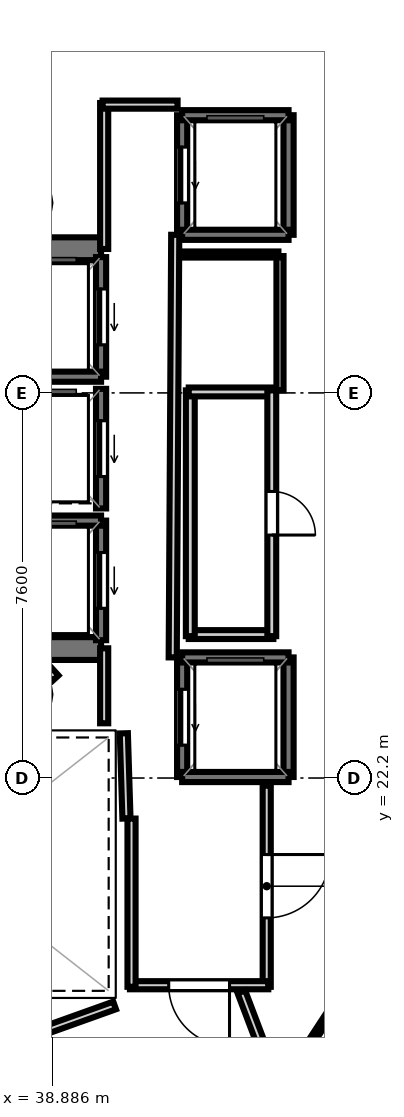
"""IFC4 building model, lengths in metres.
Left out: names, types, materials, properties, quantities, classifications, styles, units other than length and angle.
Written with IfcOpenShell. Run it as: python <this file> out.ifc"""

import sys

from ifc_helpers import new_model, si_unit, direction, frame, frame_2d, origin, place, context, subcontext, project, spatial, rectangle, extrude, element, fill, save


model = new_model("IFC4")
c1 = context("Model", 3, precision=1e-05, world=origin(), true_north=direction((0.0, 1.0)))
c2 = subcontext(c1, "Body", "Model", "MODEL_VIEW")
j1 = project(units=[si_unit("LENGTHUNIT", "METRE"), si_unit("PLANEANGLEUNIT", "RADIAN")], contexts=[c1])
p1 = place(None, origin())
s1 = spatial("IfcSite", under=j1, at=p1, CompositionType="ELEMENT")
p2 = place(p1, origin())
s2 = spatial("IfcBuilding", under=s1, at=p2, CompositionType="ELEMENT")
p3 = place(p2, frame((0.0, 0.0, 288.0)))
s3 = spatial("IfcBuildingStorey", under=s2, at=p3, CompositionType="ELEMENT", Elevation=288.0)
p4 = place(p3, frame((29.33, 32.645, 0.0), z_axis=(0.0, 0.0, 1.0), x_axis=(1.0, 0.0, 0.0)))
e1 = element("IfcWall", 1, at=p4, inside=s3, PredefinedType="SHEAR", context=c2, shape_type="SweptSolid", body=[
    extrude(rectangle(XDim=10.52, YDim=0.45, at=frame_2d((5.26, 0.0))), origin(), (0.0, 0.0, 1.0), 3.52),
])
p5 = place(p4, frame((0.895, 0.0, 0.0)))
e2 = element("IfcOpeningElement", 2, at=p5, cuts=e1, PredefinedType="OPENING", context=c2, shape_type="SweptSolid", body=[
    extrude(rectangle(XDim=1.25, YDim=2.15, at=frame_2d((0.625, 1.075))), frame((0.0, 0.235, 0.0), z_axis=(0.0, -1.0, 0.0), x_axis=(1.0, 0.0, 0.0)), (0.0, 0.0, 1.0), 0.47),
])
p6 = place(p3, frame((29.33, 24.755, 0.0), z_axis=(0.0, 0.0, 1.0), x_axis=(1.0, 0.0, 0.0)))
e3 = element("IfcWall", 3, at=p6, inside=s3, PredefinedType="SHEAR", context=c2, shape_type="SweptSolid", body=[
    extrude(rectangle(XDim=10.52, YDim=0.45, at=frame_2d((5.26, 0.0))), origin(), (0.0, 0.0, 1.0), 3.52),
])
p7 = place(p6, frame((0.695, 0.0, 0.0)))
e4 = element("IfcOpeningElement", 4, at=p7, cuts=e3, PredefinedType="OPENING", context=c2, shape_type="SweptSolid", body=[
    extrude(rectangle(XDim=1.25, YDim=2.15, at=frame_2d((0.625, 1.075))), frame((0.0, 0.235, 0.0), z_axis=(0.0, -1.0, 0.0), x_axis=(1.0, 0.0, 0.0)), (0.0, 0.0, 1.0), 0.47),
])
p8 = place(p3, frame((39.85, 30.12, 0.0), z_axis=(0.0, 0.0, 1.0), x_axis=(0.0, 1.0, 0.0)))
e5 = element("IfcWall", 5, at=p8, inside=s3, PredefinedType="SOLIDWALL", context=c2, shape_type="SweptSolid", body=[
    extrude(rectangle(XDim=2.36, YDim=0.2, at=frame_2d((1.18, 0.0))), origin(), (0.0, 0.0, 1.0), 3.52),
])
p9 = place(p8, frame((0.63, 0.0, 0.0)))
e6 = element("IfcOpeningElement", 6, at=p9, cuts=e5, PredefinedType="OPENING", context=c2, shape_type="SweptSolid", body=[
    extrude(rectangle(XDim=1.1, YDim=2.15, at=frame_2d((0.55, 1.075))), frame((0.0, 0.11, 0.0), z_axis=(0.0, -1.0, 0.0), x_axis=(1.0, 0.0, 0.0)), (0.0, 0.0, 1.0), 0.22),
])
p10 = place(p3, frame((37.75, 30.12, 0.0), z_axis=(0.0, 0.0, 1.0), x_axis=(1.0, 0.0, 0.0)))
e7 = element("IfcWall", 7, at=p10, inside=s3, PredefinedType="SOLIDWALL", context=c2, shape_type="SweptSolid", body=[
    extrude(rectangle(XDim=2.1, YDim=0.2, at=frame_2d((1.05, 0.0))), origin(), (0.0, 0.0, 1.0), 3.52),
])
p11 = place(p3, frame((39.85, 24.92, 0.0), z_axis=(0.0, 0.0, 1.0), x_axis=(0.0, 1.0, 0.0)))
e8 = element("IfcWall", 8, at=p11, inside=s3, PredefinedType="SOLIDWALL", context=c2, shape_type="SweptSolid", body=[
    extrude(rectangle(XDim=2.36, YDim=0.2, at=frame_2d((1.18, 0.0))), origin(), (0.0, 0.0, 1.0), 3.52),
])
p12 = place(p11, frame((0.63, 0.0, 0.0)))
e9 = element("IfcOpeningElement", 9, at=p12, cuts=e8, PredefinedType="OPENING", context=c2, shape_type="SweptSolid", body=[
    extrude(rectangle(XDim=1.1, YDim=2.15, at=frame_2d((0.55, 1.075))), frame((0.0, 0.11, 0.0), z_axis=(0.0, -1.0, 0.0), x_axis=(1.0, 0.0, 0.0)), (0.0, 0.0, 1.0), 0.22),
])
p13 = place(p3, frame((37.75, 27.28, 0.0), z_axis=(0.0, 0.0, 1.0), x_axis=(1.0, 0.0, 0.0)))
e10 = element("IfcWall", 10, at=p13, inside=s3, PredefinedType="SOLIDWALL", context=c2, shape_type="SweptSolid", body=[
    extrude(rectangle(XDim=2.1, YDim=0.2, at=frame_2d((1.05, 0.0))), origin(), (0.0, 0.0, 1.0), 3.52),
])
p14 = place(p3, frame((39.85, 27.52, 0.0), z_axis=(0.0, 0.0, 1.0), x_axis=(0.0, 1.0, 0.0)))
e11 = element("IfcWall", 11, at=p14, inside=s3, PredefinedType="SOLIDWALL", context=c2, shape_type="SweptSolid", body=[
    extrude(rectangle(XDim=2.36, YDim=0.2, at=frame_2d((1.18, 0.0))), origin(), (0.0, 0.0, 1.0), 3.52),
])
p15 = place(p14, frame((0.63, 0.0, 0.0)))
e12 = element("IfcOpeningElement", 12, at=p15, cuts=e11, PredefinedType="OPENING", context=c2, shape_type="SweptSolid", body=[
    extrude(rectangle(XDim=1.1, YDim=2.15, at=frame_2d((0.55, 1.075))), frame((0.0, 0.11, 0.0), z_axis=(0.0, -1.0, 0.0), x_axis=(1.0, 0.0, 0.0)), (0.0, 0.0, 1.0), 0.22),
])
p16 = place(p3, frame((43.55, 22.22, 0.0), z_axis=(0.0, 0.0, 1.0), x_axis=(0.0, 1.0, 0.0)))
e13 = element("IfcWall", 13, at=p16, inside=s3, PredefinedType="SOLIDWALL", context=c2, shape_type="SweptSolid", body=[
    extrude(rectangle(XDim=2.36, YDim=0.2, at=frame_2d((1.18, 0.0))), origin(), (0.0, 0.0, 1.0), 3.52),
])
p17 = place(p3, frame((41.45, 22.22, 0.0), z_axis=(0.0, 0.0, 1.0), x_axis=(0.0, 1.0, 0.0)))
e14 = element("IfcWall", 14, at=p17, inside=s3, PredefinedType="SOLIDWALL", context=c2, shape_type="SweptSolid", body=[
    extrude(rectangle(XDim=2.36, YDim=0.2, at=frame_2d((1.18, 0.0))), origin(), (0.0, 0.0, 1.0), 3.52),
])
p18 = place(p17, frame((0.63, 0.0, 0.0)))
e15 = element("IfcOpeningElement", 15, at=p18, cuts=e14, PredefinedType="OPENING", context=c2, shape_type="SweptSolid", body=[
    extrude(rectangle(XDim=1.1, YDim=2.15, at=frame_2d((0.55, 1.075))), frame((0.0, 0.11, 0.0), z_axis=(0.0, -1.0, 0.0), x_axis=(1.0, 0.0, 0.0)), (0.0, 0.0, 1.0), 0.22),
])
for number, where, z_axis, x_axis in (
    (16, (41.45, 24.58, 0.0), (0.0, 0.0, 1.0), (1.0, 0.0, 0.0)),
    (17, (41.45, 22.22, 0.0), (0.0, 0.0, 1.0), (1.0, 0.0, 0.0)),
):
    element("IfcWall", number, at=place(p3, frame(where, z_axis=z_axis, x_axis=x_axis)), inside=s3, PredefinedType="SOLIDWALL", context=c2, shape_type="SweptSolid", body=[
        extrude(rectangle(XDim=2.1, YDim=0.2, at=frame_2d((1.05, 0.0))), origin(), (0.0, 0.0, 1.0), 3.52),
    ])
p19 = place(p3, frame((43.55, 32.92, 0.0), z_axis=(0.0, 0.0, 1.0), x_axis=(0.0, 1.0, 0.0)))
e18 = element("IfcWall", 18, at=p19, inside=s3, PredefinedType="SOLIDWALL", context=c2, shape_type="SweptSolid", body=[
    extrude(rectangle(XDim=2.36, YDim=0.2, at=frame_2d((1.18, 0.0))), origin(), (0.0, 0.0, 1.0), 3.52),
])
p20 = place(p3, frame((41.45, 32.92, 0.0), z_axis=(0.0, 0.0, 1.0), x_axis=(0.0, 1.0, 0.0)))
e19 = element("IfcWall", 19, at=p20, inside=s3, PredefinedType="SOLIDWALL", context=c2, shape_type="SweptSolid", body=[
    extrude(rectangle(XDim=2.36, YDim=0.2, at=frame_2d((1.18, 0.0))), origin(), (0.0, 0.0, 1.0), 3.52),
])
p21 = place(p20, frame((0.63, 0.0, 0.0)))
e20 = element("IfcOpeningElement", 20, at=p21, cuts=e19, PredefinedType="OPENING", context=c2, shape_type="SweptSolid", body=[
    extrude(rectangle(XDim=1.1, YDim=2.15, at=frame_2d((0.55, 1.075))), frame((0.0, 0.11, 0.0), z_axis=(0.0, -1.0, 0.0), x_axis=(1.0, 0.0, 0.0)), (0.0, 0.0, 1.0), 0.22),
])
for number, where, z_axis, x_axis in (
    (21, (41.45, 35.28, 0.0), (0.0, 0.0, 1.0), (1.0, 0.0, 0.0)),
    (22, (41.45, 32.92, 0.0), (0.0, 0.0, 1.0), (1.0, 0.0, 0.0)),
):
    element("IfcWall", number, at=place(p3, frame(where, z_axis=z_axis, x_axis=x_axis)), inside=s3, PredefinedType="SOLIDWALL", context=c2, shape_type="SweptSolid", body=[
        extrude(rectangle(XDim=2.1, YDim=0.2, at=frame_2d((1.05, 0.0))), origin(), (0.0, 0.0, 1.0), 3.52),
    ])
p22 = place(p3, frame((40.351, 21.401, 0.0), z_axis=(0.0, 0.0, 1.0), x_axis=(-0.031058045979, 0.999517582527, 0.0)))
e23 = element("IfcWall", 23, at=p22, inside=s3, PredefinedType="PARTITIONING", context=c2, shape_type="SweptSolid", body=[
    extrude(rectangle(XDim=1.682, YDim=0.16, at=frame_2d((0.841, 0.0))), origin(), (0.0, 0.0, 1.0), 2.84),
])
p23 = place(p3, frame((39.911, 23.28, 0.0), z_axis=(0.0, 0.0, 1.0), x_axis=(0.0, 1.0, 0.0)))
e24 = element("IfcWall", 24, at=p23, inside=s3, PredefinedType="PARTITIONING", context=c2, shape_type="SweptSolid", body=[
    extrude(rectangle(XDim=1.48, YDim=0.16, at=frame_2d((0.74, 0.0))), origin(), (0.0, 0.0, 1.0), 2.84),
])
p24 = place(p3, frame((39.911, 32.64, 0.0), z_axis=(0.0, 0.0, 1.0), x_axis=(0.0, 1.0, 0.0)))
e25 = element("IfcWall", 25, at=p24, inside=s3, PredefinedType="PARTITIONING", context=c2, shape_type="SweptSolid", body=[
    extrude(rectangle(XDim=2.88, YDim=0.16, at=frame_2d((1.44, 0.0))), origin(), (0.0, 0.0, 1.0), 2.84),
])
p25 = place(p3, frame((39.88, 35.489, 0.0), z_axis=(0.0, 0.0, 1.0), x_axis=(1.0, 0.0, 0.0)))
e26 = element("IfcWall", 26, at=p25, inside=s3, PredefinedType="PARTITIONING", context=c2, shape_type="SweptSolid", body=[
    extrude(rectangle(XDim=1.48, YDim=0.16, at=frame_2d((0.74, 0.0))), origin(), (0.0, 0.0, 1.0), 2.84),
])
p26 = place(p3, frame((41.313, 32.92, 0.0), z_axis=(0.0, 0.0, 1.0), x_axis=(-0.005942518022, -0.999982343084, 0.0)))
e27 = element("IfcWall", 27, at=p26, inside=s3, PredefinedType="PARTITIONING", context=c2, shape_type="SweptSolid", body=[
    extrude(rectangle(XDim=8.34, YDim=0.16, at=frame_2d((4.17, 0.0))), origin(), (0.0, 0.0, 1.0), 2.84),
])
p27 = place(p3, frame((43.119, 22.05, 0.0), z_axis=(0.0, 0.0, 1.0), x_axis=(0.0, -1.0, 0.0)))
e28 = element("IfcWall", 28, at=p27, inside=s3, PredefinedType="PARTITIONING", context=c2, shape_type="SweptSolid", body=[
    extrude(rectangle(XDim=3.97, YDim=0.16, at=frame_2d((1.985, 0.0))), origin(), (0.0, 0.0, 1.0), 2.84),
])
p28 = place(p27, frame((1.36, 0.0, 0.0)))
e29 = element("IfcOpeningElement", 29, at=p28, cuts=e28, PredefinedType="OPENING", context=c2, shape_type="SweptSolid", body=[
    extrude(rectangle(XDim=1.25, YDim=2.2, at=frame_2d((0.625, 1.1))), frame((0.0, 0.09, 0.0), z_axis=(0.0, -1.0, 0.0), x_axis=(1.0, 0.0, 0.0)), (0.0, 0.0, 1.0), 0.18),
])
p29 = place(p3, frame((43.15, 18.111, 0.0), z_axis=(0.0, 0.0, 1.0), x_axis=(-1.0, 0.0, 0.0)))
e30 = element("IfcWall", 30, at=p29, inside=s3, PredefinedType="PARTITIONING", context=c2, shape_type="SweptSolid", body=[
    extrude(rectangle(XDim=2.73, YDim=0.16, at=frame_2d((1.365, 0.0))), origin(), (0.0, 0.0, 1.0), 2.84),
])
p30 = place(p29, frame((0.765, 0.0, 0.0)))
e31 = element("IfcOpeningElement", 31, at=p30, cuts=e30, PredefinedType="OPENING", context=c2, shape_type="SweptSolid", body=[
    extrude(rectangle(XDim=1.2, YDim=2.15, at=frame_2d((0.6, 1.075))), frame((0.0, 0.09, 0.0), z_axis=(0.0, -1.0, 0.0), x_axis=(1.0, 0.0, 0.0)), (0.0, 0.0, 1.0), 0.18),
])
p31 = place(p3, frame((40.451, 18.08, 0.0), z_axis=(0.0, 0.0, 1.0), x_axis=(0.0, 1.0, 0.0)))
e32 = element("IfcWall", 32, at=p31, inside=s3, PredefinedType="PARTITIONING", context=c2, shape_type="SweptSolid", body=[
    extrude(rectangle(XDim=3.32, YDim=0.16, at=frame_2d((1.66, 0.0))), origin(), (0.0, 0.0, 1.0), 2.84),
])
p32 = place(p3, frame((43.25, 25.031, 0.0), z_axis=(0.0, 0.0, 1.0), x_axis=(-1.0, 0.0, 0.0)))
e33 = element("IfcWall", 33, at=p32, inside=s3, PredefinedType="PLUMBINGWALL", context=c2, shape_type="SweptSolid", body=[
    extrude(rectangle(XDim=1.67, YDim=0.175, at=frame_2d((0.835, 0.0))), origin(), (0.0, 0.0, 1.0), 2.84),
])
p33 = place(p3, frame((41.611, 25.0, 0.0), z_axis=(0.0, 0.0, 1.0), x_axis=(0.0, 1.0, 0.0)))
e34 = element("IfcWall", 34, at=p33, inside=s3, PredefinedType="PLUMBINGWALL", context=c2, shape_type="SweptSolid", body=[
    extrude(rectangle(XDim=4.85, YDim=0.175, at=frame_2d((2.425, 0.0))), origin(), (0.0, 0.0, 1.0), 2.84),
])
p34 = place(p3, frame((41.58, 29.819, 0.0), z_axis=(0.0, 0.0, 1.0), x_axis=(1.0, 0.0, 0.0)))
e35 = element("IfcWall", 35, at=p34, inside=s3, PredefinedType="PLUMBINGWALL", context=c2, shape_type="SweptSolid", body=[
    extrude(rectangle(XDim=1.67, YDim=0.175, at=frame_2d((0.835, 0.0))), origin(), (0.0, 0.0, 1.0), 2.84),
])
p35 = place(p3, frame((43.219, 29.85, 0.0), z_axis=(0.0, 0.0, 1.0), x_axis=(0.0, -1.0, 0.0)))
e36 = element("IfcWall", 36, at=p35, inside=s3, PredefinedType="PLUMBINGWALL", context=c2, shape_type="SweptSolid", body=[
    extrude(rectangle(XDim=4.85, YDim=0.175, at=frame_2d((2.425, 0.0))), origin(), (0.0, 0.0, 1.0), 2.84),
])
p36 = place(p35, frame((1.995, 0.0, 0.0)))
e37 = element("IfcOpeningElement", 37, at=p36, cuts=e36, PredefinedType="OPENING", context=c2, shape_type="SweptSolid", body=[
    extrude(rectangle(XDim=0.86, YDim=2.05, at=frame_2d((0.43, 1.025))), frame((0.0, 0.097, 0.0), z_axis=(0.0, -1.0, 0.0), x_axis=(1.0, 0.0, 0.0)), (0.0, 0.0, 1.0), 0.195),
])
p37 = place(p3, frame((38.951, 24.171, 0.0), z_axis=(0.0, 0.0, 1.0), x_axis=(-0.674186852077, 0.738560822469, 0.0)))
e38 = element("IfcWall", 38, at=p37, inside=s3, PredefinedType="PARTITIONING", context=c2, shape_type="SweptSolid", body=[
    extrude(rectangle(XDim=0.281, YDim=0.16, at=frame_2d((0.14, 0.0))), origin(), (0.0, 0.0, 1.0), 2.84),
])
p38 = place(p3, frame((36.81, 16.529, 0.0), z_axis=(0.0, 0.0, 1.0), x_axis=(0.941548344365, 0.33687789364, 0.0)))
e39 = element("IfcWall", 39, at=p38, inside=s3, PredefinedType="PARTITIONING", context=c2, shape_type="SweptSolid", body=[
    extrude(rectangle(XDim=3.513, YDim=0.16, at=frame_2d((1.756, 0.0))), origin(), (0.0, 0.0, 1.0), 2.84),
])
p39 = place(p3, frame((42.619, 17.98, 0.0), z_axis=(0.0, 0.0, 1.0), x_axis=(0.354310790583, -0.935127725862, 0.0)))
e40 = element("IfcWall", 40, at=p39, inside=s3, PredefinedType="PARTITIONING", context=c2, shape_type="SweptSolid", body=[
    extrude(rectangle(XDim=2.743, YDim=0.16, at=frame_2d((1.372, 0.0))), origin(), (0.0, 0.0, 1.0), 2.84),
])
p40 = place(p3, frame((43.381, 29.85, 0.0), z_axis=(0.0, 0.0, 1.0), x_axis=(0.0, 1.0, 0.0)))
e41 = element("IfcWall", 41, at=p40, inside=s3, PredefinedType="PARTITIONING", context=c2, shape_type="SweptSolid", body=[
    extrude(rectangle(XDim=2.65, YDim=0.14, at=frame_2d((1.325, 0.0))), origin(), (0.0, 0.0, 1.0), 2.84),
])
p41 = place(p3, frame((43.35, 32.531, 0.0), z_axis=(0.0, 0.0, 1.0), x_axis=(-1.0, 0.0, 0.0)))
e42 = element("IfcWall", 42, at=p41, inside=s3, PredefinedType="PARTITIONING", context=c2, shape_type="SweptSolid", body=[
    extrude(rectangle(XDim=1.91, YDim=0.12, at=frame_2d((0.955, 0.0))), origin(), (0.0, 0.0, 1.0), 2.84),
])
p42 = place(p3, frame((56.387, 35.955, 0.0), z_axis=(0.0, 0.0, 1.0), x_axis=(-0.547085490545, -0.837076738439, 0.0)))
e43 = element("IfcWall", 43, at=p42, inside=s3, PredefinedType="PARTITIONING", context=c2, shape_type="SweptSolid", body=[
    extrude(rectangle(XDim=34.443, YDim=0.12, at=frame_2d((17.221, 0.0))), origin(), (0.0, 0.0, 1.0), 2.84),
])
p43 = place(p9, origin())
e44 = element("IfcDoor", 44, at=p43, inside=s3, OperationType="SLIDING_TO_LEFT", PredefinedType="DOOR", context=c2, shape_type="SweptSolid", body=[
    extrude(rectangle(XDim=1.1, YDim=2.15, at=frame_2d((0.55, 1.075))), frame((0.0, 0.025, 0.0), z_axis=(0.0, -1.0, 0.0), x_axis=(1.0, 0.0, 0.0)), (0.0, 0.0, 1.0), 0.05),
])
fill(e6, e44)
p44 = place(p12, origin())
e45 = element("IfcDoor", 45, at=p44, inside=s3, OperationType="SLIDING_TO_LEFT", PredefinedType="DOOR", context=c2, shape_type="SweptSolid", body=[
    extrude(rectangle(XDim=1.1, YDim=2.15, at=frame_2d((0.55, 1.075))), frame((0.0, 0.025, 0.0), z_axis=(0.0, -1.0, 0.0), x_axis=(1.0, 0.0, 0.0)), (0.0, 0.0, 1.0), 0.05),
])
fill(e9, e45)
p45 = place(p15, origin())
e46 = element("IfcDoor", 46, at=p45, inside=s3, OperationType="SLIDING_TO_LEFT", PredefinedType="DOOR", context=c2, shape_type="SweptSolid", body=[
    extrude(rectangle(XDim=1.1, YDim=2.15, at=frame_2d((0.55, 1.075))), frame((0.0, 0.025, 0.0), z_axis=(0.0, -1.0, 0.0), x_axis=(1.0, 0.0, 0.0)), (0.0, 0.0, 1.0), 0.05),
])
fill(e12, e46)
p46 = place(p18, origin())
e47 = element("IfcDoor", 47, at=p46, inside=s3, OperationType="SLIDING_TO_LEFT", PredefinedType="DOOR", context=c2, shape_type="SweptSolid", body=[
    extrude(rectangle(XDim=1.1, YDim=2.15, at=frame_2d((0.55, 1.075))), frame((0.0, 0.025, 0.0), z_axis=(0.0, -1.0, 0.0), x_axis=(1.0, 0.0, 0.0)), (0.0, 0.0, 1.0), 0.05),
])
fill(e15, e47)
p47 = place(p21, origin())
e48 = element("IfcDoor", 48, at=p47, inside=s3, OperationType="SLIDING_TO_LEFT", PredefinedType="DOOR", context=c2, shape_type="SweptSolid", body=[
    extrude(rectangle(XDim=1.1, YDim=2.15, at=frame_2d((0.55, 1.075))), frame((0.0, 0.025, 0.0), z_axis=(0.0, -1.0, 0.0), x_axis=(1.0, 0.0, 0.0)), (0.0, 0.0, 1.0), 0.05),
])
fill(e20, e48)
p48 = place(p30, origin())
e49 = element("IfcDoor", 49, at=p48, inside=s3, OperationType="SINGLE_SWING_LEFT", PredefinedType="DOOR", context=c2, shape_type="SweptSolid", body=[
    extrude(rectangle(XDim=1.2, YDim=2.15, at=frame_2d((0.6, 1.075))), frame((0.0, 0.025, 0.0), z_axis=(0.0, -1.0, 0.0), x_axis=(1.0, 0.0, 0.0)), (0.0, 0.0, 1.0), 0.05),
])
fill(e31, e49)
p49 = place(p28, origin())
e50 = element("IfcDoor", 50, at=p49, inside=s3, OperationType="SINGLE_SWING_LEFT", PredefinedType="DOOR", context=c2, shape_type="SweptSolid", body=[
    extrude(rectangle(XDim=1.25, YDim=2.2, at=frame_2d((0.625, 1.1))), frame((0.0, 0.025, 0.0), z_axis=(0.0, -1.0, 0.0), x_axis=(1.0, 0.0, 0.0)), (0.0, 0.0, 1.0), 0.05),
])
fill(e29, e50)
p50 = place(p36, origin())
e51 = element("IfcDoor", 51, at=p50, inside=s3, OperationType="SINGLE_SWING_RIGHT", PredefinedType="DOOR", context=c2, shape_type="SweptSolid", body=[
    extrude(rectangle(XDim=0.86, YDim=2.05, at=frame_2d((0.43, 1.025))), frame((0.0, 0.025, 0.0), z_axis=(0.0, -1.0, 0.0), x_axis=(1.0, 0.0, 0.0)), (0.0, 0.0, 1.0), 0.05),
])
fill(e37, e51)
save(model, sys.argv[1])
